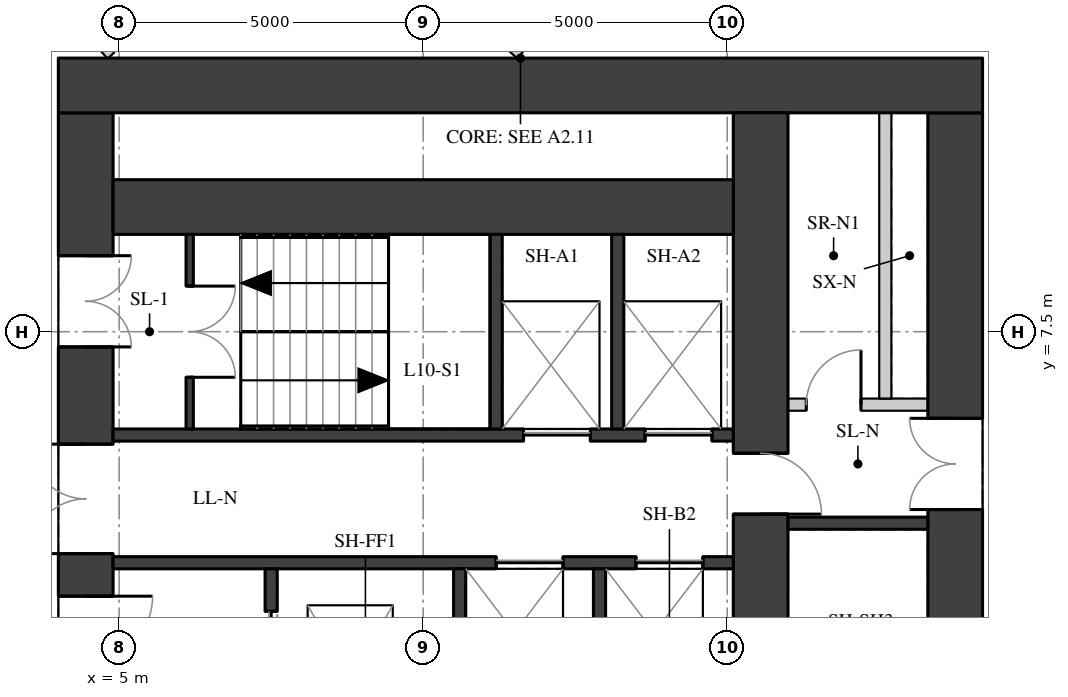
"""IFC4 building model, lengths in metres.
Left out: names, types, materials, properties, quantities, classifications, styles, units other than length and angle.
Written with IfcOpenShell. Run it as: python <this file> out.ifc"""

import sys

from ifc_helpers import new_model, si_unit, direction, frame, frame_2d, origin, place, context, subcontext, project, spatial, rectangle, extrude, element, fill, save


model = new_model("IFC4")
c1 = context("Model", 3, precision=1e-05, world=origin(), true_north=direction((0.0, 1.0)))
c2 = subcontext(c1, "Body", "Model", "MODEL_VIEW")
j1 = project(units=[si_unit("LENGTHUNIT", "METRE"), si_unit("PLANEANGLEUNIT", "RADIAN")], contexts=[c1])
p1 = place(None, origin())
s1 = spatial("IfcSite", under=j1, at=p1, CompositionType="ELEMENT")
p2 = place(p1, origin())
s2 = spatial("IfcBuilding", under=s1, at=p2, CompositionType="ELEMENT")
p3 = place(p2, frame((0.0, 0.0, 41.5)))
s3 = spatial("IfcBuildingStorey", under=s2, at=p3, CompositionType="ELEMENT", Elevation=41.5)
p4 = place(p3, frame((4.45, -11.1, 0.0), z_axis=(0.0, 0.0, 1.0), x_axis=(0.0, 1.0, 0.0)))
e1 = element("IfcWall", 1, at=p4, inside=s3, PredefinedType="SHEAR", context=c2, shape_type="SweptSolid", body=[
    extrude(rectangle(XDim=22.2, YDim=0.9, at=frame_2d((11.1, 0.0))), origin(), (0.0, 0.0, 1.0), 3.02),
])
p5 = place(p4, frame((2.35, 0.0, 0.0)))
e2 = element("IfcOpeningElement", 2, at=p5, cuts=e1, PredefinedType="OPENING", context=c2, shape_type="SweptSolid", body=[
    extrude(rectangle(XDim=1.5, YDim=2.1, at=frame_2d((0.75, 1.05))), frame((0.0, 0.46, 0.0), z_axis=(0.0, -1.0, 0.0), x_axis=(1.0, 0.0, 0.0)), (0.0, 0.0, 1.0), 0.92),
])
p6 = place(p4, frame((5.45, 0.0, 0.0)))
e3 = element("IfcOpeningElement", 3, at=p6, cuts=e1, PredefinedType="OPENING", context=c2, shape_type="SweptSolid", body=[
    extrude(rectangle(XDim=1.8, YDim=2.1, at=frame_2d((0.9, 1.05))), frame((0.0, 0.46, 0.0), z_axis=(0.0, -1.0, 0.0), x_axis=(1.0, 0.0, 0.0)), (0.0, 0.0, 1.0), 0.92),
])
p7 = place(p4, frame((7.95, 0.0, 0.0)))
e4 = element("IfcOpeningElement", 4, at=p7, cuts=e1, PredefinedType="OPENING", context=c2, shape_type="SweptSolid", body=[
    extrude(rectangle(XDim=1.1, YDim=2.1, at=frame_2d((0.55, 1.05))), frame((0.0, 0.46, 0.0), z_axis=(0.0, -1.0, 0.0), x_axis=(1.0, 0.0, 0.0)), (0.0, 0.0, 1.0), 0.92),
])
p8 = place(p4, frame((10.6, 0.0, 0.0)))
e5 = element("IfcOpeningElement", 5, at=p8, cuts=e1, PredefinedType="OPENING", context=c2, shape_type="SweptSolid", body=[
    extrude(rectangle(XDim=1.0, YDim=2.1, at=frame_2d((0.5, 1.05))), frame((0.0, 0.46, 0.0), z_axis=(0.0, -1.0, 0.0), x_axis=(1.0, 0.0, 0.0)), (0.0, 0.0, 1.0), 0.92),
])
p9 = place(p4, frame((13.15, 0.0, 0.0)))
e6 = element("IfcOpeningElement", 6, at=p9, cuts=e1, PredefinedType="OPENING", context=c2, shape_type="SweptSolid", body=[
    extrude(rectangle(XDim=1.1, YDim=2.1, at=frame_2d((0.55, 1.05))), frame((0.0, 0.46, 0.0), z_axis=(0.0, -1.0, 0.0), x_axis=(1.0, 0.0, 0.0)), (0.0, 0.0, 1.0), 0.92),
])
p10 = place(p4, frame((14.95, 0.0, 0.0)))
e7 = element("IfcOpeningElement", 7, at=p10, cuts=e1, PredefinedType="OPENING", context=c2, shape_type="SweptSolid", body=[
    extrude(rectangle(XDim=1.8, YDim=2.1, at=frame_2d((0.9, 1.05))), frame((0.0, 0.46, 0.0), z_axis=(0.0, -1.0, 0.0), x_axis=(1.0, 0.0, 0.0)), (0.0, 0.0, 1.0), 0.92),
])
p11 = place(p4, frame((18.35, 0.0, 0.0)))
e8 = element("IfcOpeningElement", 8, at=p11, cuts=e1, PredefinedType="OPENING", context=c2, shape_type="SweptSolid", body=[
    extrude(rectangle(XDim=1.5, YDim=2.1, at=frame_2d((0.75, 1.05))), frame((0.0, 0.46, 0.0), z_axis=(0.0, -1.0, 0.0), x_axis=(1.0, 0.0, 0.0)), (0.0, 0.0, 1.0), 0.92),
])
p12 = place(p3, frame((18.75, -11.1, 0.0), z_axis=(0.0, 0.0, 1.0), x_axis=(0.0, 1.0, 0.0)))
e9 = element("IfcWall", 9, at=p12, inside=s3, PredefinedType="SHEAR", context=c2, shape_type="SweptSolid", body=[
    extrude(rectangle(XDim=22.2, YDim=0.9, at=frame_2d((11.1, 0.0))), origin(), (0.0, 0.0, 1.0), 3.02),
])
p13 = place(p12, frame((15.675, 0.0, 0.0)))
e10 = element("IfcOpeningElement", 10, at=p13, cuts=e9, PredefinedType="OPENING", context=c2, shape_type="SweptSolid", body=[
    extrude(rectangle(XDim=1.5, YDim=2.1, at=frame_2d((0.75, 1.05))), frame((0.0, 0.46, 0.0), z_axis=(0.0, -1.0, 0.0), x_axis=(1.0, 0.0, 0.0)), (0.0, 0.0, 1.0), 0.92),
])
p14 = place(p12, frame((4.775, 0.0, 0.0)))
e11 = element("IfcOpeningElement", 11, at=p14, cuts=e9, PredefinedType="OPENING", context=c2, shape_type="SweptSolid", body=[
    extrude(rectangle(XDim=1.5, YDim=2.1, at=frame_2d((0.75, 1.05))), frame((0.0, 0.46, 0.0), z_axis=(0.0, -1.0, 0.0), x_axis=(1.0, 0.0, 0.0)), (0.0, 0.0, 1.0), 0.92),
])
p15 = place(p3, frame((4.0, 11.55, 0.0), z_axis=(0.0, 0.0, 1.0), x_axis=(1.0, 0.0, 0.0)))
e12 = element("IfcWall", 12, at=p15, inside=s3, PredefinedType="SHEAR", context=c2, shape_type="SweptSolid", body=[
    extrude(rectangle(XDim=15.2, YDim=0.9, at=frame_2d((7.6, 0.0))), origin(), (0.0, 0.0, 1.0), 3.02),
])
p16 = place(p3, frame((15.55, -11.1, 0.0), z_axis=(0.0, 0.0, 1.0), x_axis=(0.0, 1.0, 0.0)))
e13 = element("IfcWall", 13, at=p16, inside=s3, PredefinedType="SHEAR", context=c2, shape_type="SweptSolid", body=[
    extrude(rectangle(XDim=22.2, YDim=0.9, at=frame_2d((11.1, 0.0))), origin(), (0.0, 0.0, 1.0), 3.02),
])
p17 = place(p16, frame((15.6, 0.0, 0.0)))
e14 = element("IfcOpeningElement", 14, at=p17, cuts=e13, PredefinedType="OPENING", context=c2, shape_type="SweptSolid", body=[
    extrude(rectangle(XDim=1.0, YDim=2.1, at=frame_2d((0.5, 1.05))), frame((0.0, 0.46, 0.0), z_axis=(0.0, -1.0, 0.0), x_axis=(1.0, 0.0, 0.0)), (0.0, 0.0, 1.0), 0.92),
])
p18 = place(p16, frame((5.6, 0.0, 0.0)))
e15 = element("IfcOpeningElement", 15, at=p18, cuts=e13, PredefinedType="OPENING", context=c2, shape_type="SweptSolid", body=[
    extrude(rectangle(XDim=1.0, YDim=2.1, at=frame_2d((0.5, 1.05))), frame((0.0, 0.46, 0.0), z_axis=(0.0, -1.0, 0.0), x_axis=(1.0, 0.0, 0.0)), (0.0, 0.0, 1.0), 0.92),
])
p19 = place(p3, frame((4.9, 9.55, 0.0), z_axis=(0.0, 0.0, 1.0), x_axis=(1.0, 0.0, 0.0)))
e16 = element("IfcWall", 16, at=p19, inside=s3, PredefinedType="SHEAR", context=c2, shape_type="SweptSolid", body=[
    extrude(rectangle(XDim=10.2, YDim=0.9, at=frame_2d((5.1, 0.0))), origin(), (0.0, 0.0, 1.0), 3.02),
])
p20 = place(p3, frame((4.9, 5.8, 0.0), z_axis=(0.0, 0.0, 1.0), x_axis=(1.0, 0.0, 0.0)))
e17 = element("IfcWall", 17, at=p20, inside=s3, PredefinedType="SHEAR", context=c2, shape_type="SweptSolid", body=[
    extrude(rectangle(XDim=10.2, YDim=0.2, at=frame_2d((5.1, 0.0))), origin(), (0.0, 0.0, 1.0), 3.02),
])
p21 = place(p20, frame((6.75, 0.0, 0.0)))
e18 = element("IfcOpeningElement", 18, at=p21, cuts=e17, PredefinedType="OPENING", context=c2, shape_type="SweptSolid", body=[
    extrude(rectangle(XDim=1.1, YDim=2.1, at=frame_2d((0.55, 1.05))), frame((0.0, 0.11, 0.0), z_axis=(0.0, -1.0, 0.0), x_axis=(1.0, 0.0, 0.0)), (0.0, 0.0, 1.0), 0.22),
])
p22 = place(p20, frame((8.75, 0.0, 0.0)))
e19 = element("IfcOpeningElement", 19, at=p22, cuts=e17, PredefinedType="OPENING", context=c2, shape_type="SweptSolid", body=[
    extrude(rectangle(XDim=1.1, YDim=2.1, at=frame_2d((0.55, 1.05))), frame((0.0, 0.11, 0.0), z_axis=(0.0, -1.0, 0.0), x_axis=(1.0, 0.0, 0.0)), (0.0, 0.0, 1.0), 0.22),
])
p23 = place(p3, frame((4.9, 3.7, 0.0), z_axis=(0.0, 0.0, 1.0), x_axis=(1.0, 0.0, 0.0)))
e20 = element("IfcWall", 20, at=p23, inside=s3, PredefinedType="SHEAR", context=c2, shape_type="SweptSolid", body=[
    extrude(rectangle(XDim=10.2, YDim=0.2, at=frame_2d((5.1, 0.0))), origin(), (0.0, 0.0, 1.0), 3.02),
])
p24 = place(p23, frame((6.3, 0.0, 0.0)))
e21 = element("IfcOpeningElement", 21, at=p24, cuts=e20, PredefinedType="OPENING", context=c2, shape_type="SweptSolid", body=[
    extrude(rectangle(XDim=1.1, YDim=2.1, at=frame_2d((0.55, 1.05))), frame((0.0, 0.11, 0.0), z_axis=(0.0, -1.0, 0.0), x_axis=(1.0, 0.0, 0.0)), (0.0, 0.0, 1.0), 0.22),
])
p25 = place(p23, frame((8.6, 0.0, 0.0)))
e22 = element("IfcOpeningElement", 22, at=p25, cuts=e20, PredefinedType="OPENING", context=c2, shape_type="SweptSolid", body=[
    extrude(rectangle(XDim=1.1, YDim=2.1, at=frame_2d((0.55, 1.05))), frame((0.0, 0.11, 0.0), z_axis=(0.0, -1.0, 0.0), x_axis=(1.0, 0.0, 0.0)), (0.0, 0.0, 1.0), 0.22),
])
for number, where, z_axis, x_axis in (
    (23, (11.2, 5.9, 0.0), (0.0, 0.0, 1.0), (0.0, 1.0, 0.0)),
    (24, (13.2, 5.9, 0.0), (0.0, 0.0, 1.0), (0.0, 1.0, 0.0)),
):
    element("IfcWall", number, at=place(p3, frame(where, z_axis=z_axis, x_axis=x_axis)), inside=s3, PredefinedType="SHEAR", context=c2, shape_type="SweptSolid", body=[
        extrude(rectangle(XDim=3.2, YDim=0.2, at=frame_2d((1.6, 0.0))), origin(), (0.0, 0.0, 1.0), 3.02),
    ])
p26 = place(p3, frame((7.5, 1.1, 0.0), z_axis=(0.0, 0.0, 1.0), x_axis=(0.0, 1.0, 0.0)))
e25 = element("IfcWall", 25, at=p26, inside=s3, PredefinedType="SHEAR", context=c2, shape_type="SweptSolid", body=[
    extrude(rectangle(XDim=2.5, YDim=0.2, at=frame_2d((1.25, 0.0))), origin(), (0.0, 0.0, 1.0), 3.02),
])
p27 = place(p26, frame((0.7, 0.0, 0.0)))
e26 = element("IfcOpeningElement", 26, at=p27, cuts=e25, PredefinedType="OPENING", context=c2, shape_type="SweptSolid", body=[
    extrude(rectangle(XDim=1.1, YDim=2.1, at=frame_2d((0.55, 1.05))), frame((0.0, 0.11, 0.0), z_axis=(0.0, -1.0, 0.0), x_axis=(1.0, 0.0, 0.0)), (0.0, 0.0, 1.0), 0.22),
])
for number, where, z_axis, x_axis in (
    (27, (10.6, 1.1, 0.0), (0.0, 0.0, 1.0), (0.0, 1.0, 0.0)),
    (28, (12.9, 1.1, 0.0), (0.0, 0.0, 1.0), (0.0, 1.0, 0.0)),
):
    element("IfcWall", number, at=place(p3, frame(where, z_axis=z_axis, x_axis=x_axis)), inside=s3, PredefinedType="SHEAR", context=c2, shape_type="SweptSolid", body=[
        extrude(rectangle(XDim=2.5, YDim=0.2, at=frame_2d((1.25, 0.0))), origin(), (0.0, 0.0, 1.0), 3.02),
    ])
p28 = place(p3, frame((6.16, 5.9, 0.0), z_axis=(0.0, 0.0, 1.0), x_axis=(0.0, 1.0, 0.0)))
e29 = element("IfcWall", 29, at=p28, inside=s3, PredefinedType="SHEAR", context=c2, shape_type="SweptSolid", body=[
    extrude(rectangle(XDim=3.2, YDim=0.12, at=frame_2d((1.6, 0.0))), origin(), (0.0, 0.0, 1.0), 3.02),
])
p29 = place(p28, frame((0.85, 0.0, 0.0)))
e30 = element("IfcOpeningElement", 30, at=p29, cuts=e29, PredefinedType="OPENING", context=c2, shape_type="SweptSolid", body=[
    extrude(rectangle(XDim=1.5, YDim=2.1, at=frame_2d((0.75, 1.05))), frame((0.0, 0.07, 0.0), z_axis=(0.0, -1.0, 0.0), x_axis=(1.0, 0.0, 0.0)), (0.0, 0.0, 1.0), 0.14),
])
p30 = place(p3, frame((16.0, 4.35, 0.0), z_axis=(0.0, 0.0, 1.0), x_axis=(1.0, 0.0, 0.0)))
e31 = element("IfcWall", 31, at=p30, inside=s3, PredefinedType="SHEAR", context=c2, shape_type="SweptSolid", body=[
    extrude(rectangle(XDim=2.3, YDim=0.2, at=frame_2d((1.15, 0.0))), origin(), (0.0, 0.0, 1.0), 3.02),
])
p31 = place(p3, frame((16.0, 6.3, 0.0), z_axis=(0.0, 0.0, 1.0), x_axis=(1.0, 0.0, 0.0)))
e32 = element("IfcWall", 32, at=p31, inside=s3, PredefinedType="PARTITIONING", context=c2, shape_type="SweptSolid", body=[
    extrude(rectangle(XDim=2.3, YDim=0.2, at=frame_2d((1.15, 0.0))), origin(), (0.0, 0.0, 1.0), 3.02),
])
p32 = place(p31, frame((0.3, 0.0, 0.0)))
e33 = element("IfcOpeningElement", 33, at=p32, cuts=e32, PredefinedType="OPENING", context=c2, shape_type="SweptSolid", body=[
    extrude(rectangle(XDim=0.9, YDim=2.1, at=frame_2d((0.45, 1.05))), frame((0.0, 0.11, 0.0), z_axis=(0.0, -1.0, 0.0), x_axis=(1.0, 0.0, 0.0)), (0.0, 0.0, 1.0), 0.22),
])
p33 = place(p3, frame((17.6, 6.4, 0.0), z_axis=(0.0, 0.0, 1.0), x_axis=(0.0, 1.0, 0.0)))
e34 = element("IfcWall", 34, at=p33, inside=s3, PredefinedType="PARTITIONING", context=c2, shape_type="SweptSolid", body=[
    extrude(rectangle(XDim=4.7, YDim=0.2, at=frame_2d((2.35, 0.0))), origin(), (0.0, 0.0, 1.0), 3.02),
])
p34 = place(p3, frame((4.865, 12.042, 0.0), z_axis=(0.0, 0.0, 1.0), x_axis=(-0.660014599896, 0.751252772323, 0.0)))
e35 = element("IfcWall", 35, at=p34, inside=s3, PredefinedType="PARTITIONING", context=c2, shape_type="SweptSolid", body=[
    extrude(rectangle(XDim=0.835, YDim=0.15, at=frame_2d((0.417, 0.0))), origin(), (0.0, 0.0, 1.0), 2.57),
])
p35 = place(p3, frame((9.901, 13.562, 0.0), z_axis=(0.0, 0.0, 1.0), x_axis=(0.746696753395, -0.665164610054, 0.0)))
e36 = element("IfcWall", 36, at=p35, inside=s3, PredefinedType="PARTITIONING", context=c2, shape_type="SweptSolid", body=[
    extrude(rectangle(XDim=2.27, YDim=0.15, at=frame_2d((1.135, 0.0))), origin(), (0.0, 0.0, 1.0), 3.02),
])
p36 = place(p9, origin())
e37 = element("IfcDoor", 37, at=p36, inside=s3, OperationType="SINGLE_SWING_LEFT", PredefinedType="DOOR", context=c2, shape_type="SweptSolid", body=[
    extrude(rectangle(XDim=1.1, YDim=2.1, at=frame_2d((0.55, 1.05))), frame((0.0, 0.025, 0.0), z_axis=(0.0, -1.0, 0.0), x_axis=(1.0, 0.0, 0.0)), (0.0, 0.0, 1.0), 0.05),
])
fill(e6, e37)
p37 = place(p10, origin())
e38 = element("IfcDoor", 38, at=p37, inside=s3, OperationType="DOUBLE_DOOR_SINGLE_SWING", PredefinedType="DOOR", context=c2, shape_type="SweptSolid", body=[
    extrude(rectangle(XDim=1.8, YDim=2.1, at=frame_2d((0.9, 1.05))), frame((0.0, 0.025, 0.0), z_axis=(0.0, -1.0, 0.0), x_axis=(1.0, 0.0, 0.0)), (0.0, 0.0, 1.0), 0.05),
])
fill(e7, e38)
p38 = place(p11, origin())
e39 = element("IfcDoor", 39, at=p38, inside=s3, OperationType="DOUBLE_DOOR_SINGLE_SWING", PredefinedType="DOOR", context=c2, shape_type="SweptSolid", body=[
    extrude(rectangle(XDim=1.5, YDim=2.1, at=frame_2d((0.75, 1.05))), frame((0.0, 0.025, 0.0), z_axis=(0.0, -1.0, 0.0), x_axis=(1.0, 0.0, 0.0)), (0.0, 0.0, 1.0), 0.05),
])
fill(e8, e39)
p39 = place(p13, origin())
e40 = element("IfcDoor", 40, at=p39, inside=s3, OperationType="DOUBLE_DOOR_SINGLE_SWING", PredefinedType="DOOR", context=c2, shape_type="SweptSolid", body=[
    extrude(rectangle(XDim=1.5, YDim=2.1, at=frame_2d((0.75, 1.05))), frame((0.0, 0.025, 0.0), z_axis=(0.0, -1.0, 0.0), x_axis=(1.0, 0.0, 0.0)), (0.0, 0.0, 1.0), 0.05),
])
fill(e10, e40)
p40 = place(p29, origin())
e41 = element("IfcDoor", 41, at=p40, inside=s3, OperationType="DOUBLE_DOOR_SINGLE_SWING", PredefinedType="DOOR", context=c2, shape_type="SweptSolid", body=[
    extrude(rectangle(XDim=1.5, YDim=2.1, at=frame_2d((0.75, 1.05))), frame((0.0, 0.025, 0.0), z_axis=(0.0, -1.0, 0.0), x_axis=(1.0, 0.0, 0.0)), (0.0, 0.0, 1.0), 0.05),
])
fill(e30, e41)
p41 = place(p21, origin())
e42 = element("IfcDoor", 42, at=p41, inside=s3, OperationType="DOUBLE_DOOR_SLIDING", PredefinedType="DOOR", context=c2, shape_type="SweptSolid", body=[
    extrude(rectangle(XDim=1.1, YDim=2.1, at=frame_2d((0.55, 1.05))), frame((0.0, 0.025, 0.0), z_axis=(0.0, -1.0, 0.0), x_axis=(1.0, 0.0, 0.0)), (0.0, 0.0, 1.0), 0.05),
])
fill(e18, e42)
p42 = place(p22, origin())
e43 = element("IfcDoor", 43, at=p42, inside=s3, OperationType="DOUBLE_DOOR_SLIDING", PredefinedType="DOOR", context=c2, shape_type="SweptSolid", body=[
    extrude(rectangle(XDim=1.1, YDim=2.1, at=frame_2d((0.55, 1.05))), frame((0.0, 0.025, 0.0), z_axis=(0.0, -1.0, 0.0), x_axis=(1.0, 0.0, 0.0)), (0.0, 0.0, 1.0), 0.05),
])
fill(e19, e43)
p43 = place(p24, origin())
e44 = element("IfcDoor", 44, at=p43, inside=s3, OperationType="DOUBLE_DOOR_SLIDING", PredefinedType="DOOR", context=c2, shape_type="SweptSolid", body=[
    extrude(rectangle(XDim=1.1, YDim=2.1, at=frame_2d((0.55, 1.05))), frame((0.0, 0.025, 0.0), z_axis=(0.0, -1.0, 0.0), x_axis=(1.0, 0.0, 0.0)), (0.0, 0.0, 1.0), 0.05),
])
fill(e21, e44)
p44 = place(p25, origin())
e45 = element("IfcDoor", 45, at=p44, inside=s3, OperationType="DOUBLE_DOOR_SLIDING", PredefinedType="DOOR", context=c2, shape_type="SweptSolid", body=[
    extrude(rectangle(XDim=1.1, YDim=2.1, at=frame_2d((0.55, 1.05))), frame((0.0, 0.025, 0.0), z_axis=(0.0, -1.0, 0.0), x_axis=(1.0, 0.0, 0.0)), (0.0, 0.0, 1.0), 0.05),
])
fill(e22, e45)
p45 = place(p27, origin())
e46 = element("IfcDoor", 46, at=p45, inside=s3, OperationType="DOUBLE_DOOR_SLIDING", PredefinedType="DOOR", context=c2, shape_type="SweptSolid", body=[
    extrude(rectangle(XDim=1.1, YDim=2.1, at=frame_2d((0.55, 1.05))), frame((0.0, 0.025, 0.0), z_axis=(0.0, -1.0, 0.0), x_axis=(1.0, 0.0, 0.0)), (0.0, 0.0, 1.0), 0.05),
])
fill(e26, e46)
p46 = place(p17, origin())
e47 = element("IfcDoor", 47, at=p46, inside=s3, OperationType="SINGLE_SWING_RIGHT", PredefinedType="DOOR", context=c2, shape_type="SweptSolid", body=[
    extrude(rectangle(XDim=1.0, YDim=2.1, at=frame_2d((0.5, 1.05))), frame((0.0, 0.025, 0.0), z_axis=(0.0, -1.0, 0.0), x_axis=(1.0, 0.0, 0.0)), (0.0, 0.0, 1.0), 0.05),
])
fill(e14, e47)
p47 = place(p32, origin())
e48 = element("IfcDoor", 48, at=p47, inside=s3, OperationType="SINGLE_SWING_RIGHT", PredefinedType="DOOR", context=c2, shape_type="SweptSolid", body=[
    extrude(rectangle(XDim=0.9, YDim=2.1, at=frame_2d((0.45, 1.05))), frame((0.0, 0.025, 0.0), z_axis=(0.0, -1.0, 0.0), x_axis=(1.0, 0.0, 0.0)), (0.0, 0.0, 1.0), 0.05),
])
fill(e33, e48)
save(model, sys.argv[1])
